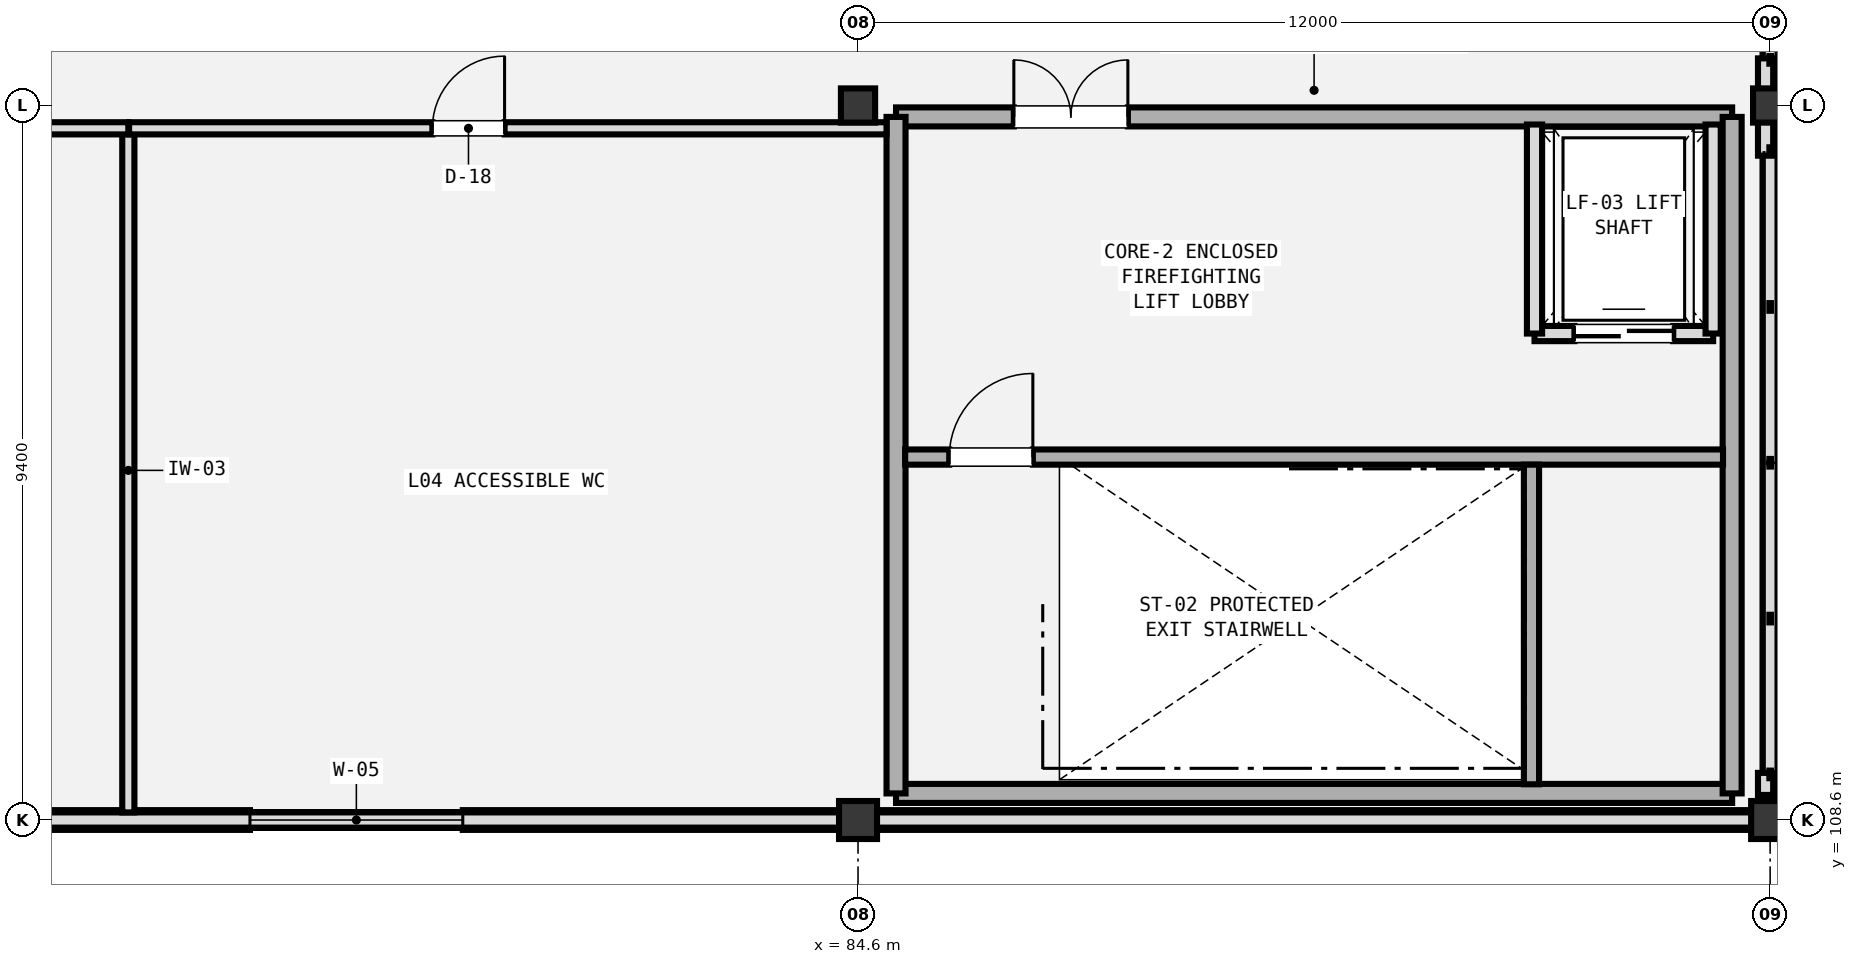
"""IFC4 building model, lengths in metres.
Left out: names, types, materials, properties, quantities, classifications, styles, units other than length and angle.
Written with IfcOpenShell. Run it as: python <this file> out.ifc"""

import sys

from ifc_helpers import new_model, si_unit, direction, frame, frame_2d, origin, origin_2d, place, context, subcontext, project, spatial, rectangle, extrude, element, fill, save


model = new_model("IFC4")
c1 = context("Model", 3, precision=1e-05, world=origin(), true_north=direction((0.0, 1.0)))
c2 = subcontext(c1, "Body", "Model", "MODEL_VIEW")
j1 = project(units=[si_unit("LENGTHUNIT", "METRE"), si_unit("PLANEANGLEUNIT", "RADIAN")], contexts=[c1])
p1 = place(None, origin())
s1 = spatial("IfcSite", under=j1, at=p1, CompositionType="ELEMENT")
p2 = place(p1, origin())
s2 = spatial("IfcBuilding", under=s1, at=p2, CompositionType="ELEMENT")
p3 = place(p2, frame((0.0, 0.0, 18.6)))
s3 = spatial("IfcBuildingStorey", under=s2, at=p3, CompositionType="ELEMENT", Elevation=18.6)
p4 = place(p3, frame((84.6, 108.6, 0.0), z_axis=(0.0, 0.0, 1.0), x_axis=(1.0, 0.0, 0.0)))
e1 = element("IfcColumn", 1, at=p4, inside=s3, PredefinedType="COLUMN", context=c2, shape_type="SweptSolid", body=[
    extrude(rectangle(XDim=0.5, YDim=0.5, at=origin_2d()), origin(), (0.0, 0.0, 1.0), 3.88),
])
p5 = place(p3, frame((84.6, 118.0, 0.0), z_axis=(0.0, 0.0, 1.0), x_axis=(1.0, 0.0, 0.0)))
e2 = element("IfcColumn", 2, at=p5, inside=s3, PredefinedType="COLUMN", context=c2, shape_type="SweptSolid", body=[
    extrude(rectangle(XDim=0.45, YDim=0.45, at=origin_2d()), origin(), (0.0, 0.0, 1.0), 3.88),
])
p6 = place(p3, frame((96.6, 108.6, 0.0), z_axis=(0.0, 0.0, 1.0), x_axis=(1.0, 0.0, 0.0)))
e3 = element("IfcColumn", 3, at=p6, inside=s3, PredefinedType="COLUMN", context=c2, shape_type="SweptSolid", body=[
    extrude(rectangle(XDim=0.5, YDim=0.5, at=origin_2d()), origin(), (0.0, 0.0, 1.0), 3.88),
])
p7 = place(p3, frame((96.6, 118.0, 0.0), z_axis=(0.0, 0.0, 1.0), x_axis=(1.0, 0.0, 0.0)))
e4 = element("IfcColumn", 4, at=p7, inside=s3, PredefinedType="COLUMN", context=c2, shape_type="SweptSolid", body=[
    extrude(rectangle(XDim=0.45, YDim=0.45, at=origin_2d()), origin(), (0.0, 0.0, 1.0), 3.88),
])
p8 = place(p3, frame((48.6, 108.6, 0.0), z_axis=(0.0, 0.0, 1.0), x_axis=(1.0, 0.0, 0.0)))
e5 = element("IfcWall", 5, at=p8, inside=s3, PredefinedType="SOLIDWALL", context=c2, shape_type="SweptSolid", body=[
    extrude(rectangle(XDim=48.0, YDim=0.26, at=frame_2d((24.0, 0.0))), origin(), (0.0, 0.0, 1.0), 3.43),
])
p9 = place(p8, frame((14.0, 0.0, 0.85)))
e6 = element("IfcOpeningElement", 6, at=p9, cuts=e5, PredefinedType="OPENING", context=c2, shape_type="SweptSolid", body=[
    extrude(rectangle(XDim=3.6, YDim=1.2, at=frame_2d((1.8, 0.6))), frame((0.0, 0.14, 0.0), z_axis=(0.0, -1.0, 0.0), x_axis=(1.0, 0.0, 0.0)), (0.0, 0.0, 1.0), 0.28),
])
p10 = place(p8, frame((28.0, 0.0, 0.85)))
e7 = element("IfcOpeningElement", 7, at=p10, cuts=e5, PredefinedType="OPENING", context=c2, shape_type="SweptSolid", body=[
    extrude(rectangle(XDim=2.8, YDim=1.2, at=frame_2d((1.4, 0.6))), frame((0.0, 0.14, 0.0), z_axis=(0.0, -1.0, 0.0), x_axis=(1.0, 0.0, 0.0)), (0.0, 0.0, 1.0), 0.28),
])
p11 = place(p3, frame((48.6, 108.6, 4.2), z_axis=(0.0, 0.0, 1.0), x_axis=(1.0, 0.0, 0.0)))
e8 = element("IfcWall", 8, at=p11, inside=s3, PredefinedType="PARAPET", context=c2, shape_type="SweptSolid", body=[
    extrude(rectangle(XDim=48.0, YDim=0.2, at=frame_2d((24.0, 0.0))), origin(), (0.0, 0.0, 1.0), 1.15),
])
p12 = place(p3, frame((96.6, 108.6, 4.2), z_axis=(0.0, 0.0, 1.0), x_axis=(0.0, 1.0, 0.0)))
e9 = element("IfcWall", 9, at=p12, inside=s3, PredefinedType="PARAPET", context=c2, shape_type="SweptSolid", body=[
    extrude(rectangle(XDim=27.4, YDim=0.2, at=frame_2d((13.7, 0.0))), origin(), (0.0, 0.0, 1.0), 1.15),
])
p13 = place(p3, frame((85.1, 108.95, 0.0), z_axis=(0.0, 0.0, 1.0), x_axis=(1.0, 0.0, 0.0)))
e10 = element("IfcWall", 10, at=p13, inside=s3, PredefinedType="SHEAR", context=c2, shape_type="SweptSolid", body=[
    extrude(rectangle(XDim=11.0, YDim=0.25, at=frame_2d((5.5, 0.0))), origin(), (0.0, 0.0, 1.0), 3.88),
])
p14 = place(p3, frame((85.1, 117.85, 0.0), z_axis=(0.0, 0.0, 1.0), x_axis=(1.0, 0.0, 0.0)))
e11 = element("IfcWall", 11, at=p14, inside=s3, PredefinedType="SHEAR", context=c2, shape_type="SweptSolid", body=[
    extrude(rectangle(XDim=11.0, YDim=0.25, at=frame_2d((5.5, 0.0))), origin(), (0.0, 0.0, 1.0), 3.88),
])
p15 = place(p14, frame((1.55, 0.0, 0.0)))
e12 = element("IfcOpeningElement", 12, at=p15, cuts=e11, PredefinedType="OPENING", context=c2, shape_type="SweptSolid", body=[
    extrude(rectangle(XDim=1.5, YDim=2.2, at=frame_2d((0.75, 1.1))), frame((0.0, 0.135, 0.0), z_axis=(0.0, -1.0, 0.0), x_axis=(1.0, 0.0, 0.0)), (0.0, 0.0, 1.0), 0.27),
])
for number, where, z_axis, x_axis in (
    (13, (85.1, 108.95, 0.0), (0.0, 0.0, 1.0), (0.0, 1.0, 0.0)),
    (14, (96.1, 108.95, 0.0), (0.0, 0.0, 1.0), (0.0, 1.0, 0.0)),
):
    element("IfcWall", number, at=place(p3, frame(where, z_axis=z_axis, x_axis=x_axis)), inside=s3, PredefinedType="SHEAR", context=c2, shape_type="SweptSolid", body=[
        extrude(rectangle(XDim=8.9, YDim=0.25, at=frame_2d((4.45, 0.0))), origin(), (0.0, 0.0, 1.0), 3.88),
    ])
p16 = place(p3, frame((85.22, 113.375, 0.0), z_axis=(0.0, 0.0, 1.0), x_axis=(1.0, 0.0, 0.0)))
e15 = element("IfcWall", 15, at=p16, inside=s3, PredefinedType="SHEAR", context=c2, shape_type="SweptSolid", body=[
    extrude(rectangle(XDim=10.76, YDim=0.2, at=frame_2d((5.38, 0.0))), origin(), (0.0, 0.0, 1.0), 3.88),
])
p17 = place(p16, frame((0.58, 0.0, 0.0)))
e16 = element("IfcOpeningElement", 16, at=p17, cuts=e15, PredefinedType="OPENING", context=c2, shape_type="SweptSolid", body=[
    extrude(rectangle(XDim=1.1, YDim=2.2, at=frame_2d((0.55, 1.1))), frame((0.0, 0.11, 0.0), z_axis=(0.0, -1.0, 0.0), x_axis=(1.0, 0.0, 0.0)), (0.0, 0.0, 1.0), 0.22),
])
p18 = place(p3, frame((93.46, 109.07, 0.0), z_axis=(0.0, 0.0, 1.0), x_axis=(0.0, 1.0, 0.0)))
e17 = element("IfcWall", 17, at=p18, inside=s3, PredefinedType="SHEAR", context=c2, shape_type="SweptSolid", body=[
    extrude(rectangle(XDim=4.205, YDim=0.2, at=frame_2d((2.103, 0.0))), origin(), (0.0, 0.0, 1.0), 3.88),
])
p19 = place(p3, frame((93.5, 115.0, 0.0), z_axis=(0.0, 0.0, 1.0), x_axis=(1.0, 0.0, 0.0)))
e18 = element("IfcWall", 18, at=p19, inside=s3, PredefinedType="SOLIDWALL", context=c2, shape_type="SweptSolid", body=[
    extrude(rectangle(XDim=2.35, YDim=0.2, at=frame_2d((1.175, 0.0))), origin(), (0.0, 0.0, 1.0), 3.28),
])
p20 = place(p19, frame((0.525, 0.0, 0.0)))
e19 = element("IfcOpeningElement", 19, at=p20, cuts=e18, PredefinedType="OPENING", context=c2, shape_type="SweptSolid", body=[
    extrude(rectangle(XDim=1.3, YDim=2.3, at=frame_2d((0.65, 1.15))), frame((0.0, 0.11, 0.0), z_axis=(0.0, -1.0, 0.0), x_axis=(1.0, 0.0, 0.0)), (0.0, 0.0, 1.0), 0.22),
])
for number, where, z_axis, x_axis in (
    (20, (93.5, 115.0, 0.0), (0.0, 0.0, 1.0), (0.0, 1.0, 0.0)),
    (21, (95.85, 115.0, 0.0), (0.0, 0.0, 1.0), (0.0, 1.0, 0.0)),
):
    element("IfcWall", number, at=place(p3, frame(where, z_axis=z_axis, x_axis=x_axis)), inside=s3, PredefinedType="SOLIDWALL", context=c2, shape_type="SweptSolid", body=[
        extrude(rectangle(XDim=2.75, YDim=0.2, at=frame_2d((1.375, 0.0))), origin(), (0.0, 0.0, 1.0), 3.88),
    ])
p21 = place(p3, frame((75.0, 108.7, 0.0), z_axis=(0.0, 0.0, 1.0), x_axis=(0.0, 1.0, 0.0)))
e22 = element("IfcWall", 22, at=p21, inside=s3, PredefinedType="PLUMBINGWALL", context=c2, shape_type="SweptSolid", body=[
    extrude(rectangle(XDim=9.0, YDim=0.16, at=frame_2d((4.5, 0.0))), origin(), (0.0, 0.0, 1.0), 3.25),
])
p22 = place(p3, frame((67.61, 117.7, 0.0), z_axis=(0.0, 0.0, 1.0), x_axis=(1.0, 0.0, 0.0)))
e23 = element("IfcWall", 23, at=p22, inside=s3, PredefinedType="PLUMBINGWALL", context=c2, shape_type="SweptSolid", body=[
    extrude(rectangle(XDim=7.39, YDim=0.16, at=frame_2d((3.695, 0.0))), origin(), (0.0, 0.0, 1.0), 3.25),
])
p23 = place(p22, frame((2.99, 0.0, 0.0)))
e24 = element("IfcOpeningElement", 24, at=p23, cuts=e23, PredefinedType="OPENING", context=c2, shape_type="SweptSolid", body=[
    extrude(rectangle(XDim=0.95, YDim=2.15, at=frame_2d((0.475, 1.075))), frame((0.0, 0.09, 0.0), z_axis=(0.0, -1.0, 0.0), x_axis=(1.0, 0.0, 0.0)), (0.0, 0.0, 1.0), 0.18),
])
p24 = place(p3, frame((75.01, 117.7, 0.0), z_axis=(0.0, 0.0, 1.0), x_axis=(1.0, 0.0, 0.0)))
e25 = element("IfcWall", 25, at=p24, inside=s3, PredefinedType="PLUMBINGWALL", context=c2, shape_type="SweptSolid", body=[
    extrude(rectangle(XDim=9.965, YDim=0.16, at=frame_2d((4.982, 0.0))), origin(), (0.0, 0.0, 1.0), 3.25),
])
p25 = place(p24, frame((3.99, 0.0, 0.0)))
e26 = element("IfcOpeningElement", 26, at=p25, cuts=e25, PredefinedType="OPENING", context=c2, shape_type="SweptSolid", body=[
    extrude(rectangle(XDim=0.95, YDim=2.15, at=frame_2d((0.475, 1.075))), frame((0.0, 0.09, 0.0), z_axis=(0.0, -1.0, 0.0), x_axis=(1.0, 0.0, 0.0)), (0.0, 0.0, 1.0), 0.18),
])
p26 = place(p3, frame((96.54, 118.62, 0.0), z_axis=(0.0, 0.0, 1.0), x_axis=(0.0, -1.0, 0.0)))
e27 = element("IfcWall", 27, at=p26, inside=s3, PredefinedType="SOLIDWALL", context=c2, shape_type="SweptSolid", body=[
    extrude(rectangle(XDim=1.28, YDim=0.2, at=frame_2d((0.64, 0.0))), origin(), (0.0, 0.0, 1.0), 3.2),
])
p27 = place(p3, frame((96.54, 109.22, 0.0), z_axis=(0.0, 0.0, 1.0), x_axis=(0.0, -1.0, 0.0)))
e28 = element("IfcWall", 28, at=p27, inside=s3, PredefinedType="SOLIDWALL", context=c2, shape_type="SweptSolid", body=[
    extrude(rectangle(XDim=0.29, YDim=0.2, at=frame_2d((0.145, 0.0))), origin(), (0.0, 0.0, 1.0), 3.2),
])
p28 = place(p10, frame((2.8, 0.0, 0.0), z_axis=(0.0, 0.0, 1.0), x_axis=(-1.0, 0.0, 0.0)))
e29 = element("IfcWindow", 29, at=p28, inside=s3, PartitioningType="DOUBLE_PANEL_HORIZONTAL", PredefinedType="WINDOW", context=c2, shape_type="SweptSolid", body=[
    extrude(rectangle(XDim=2.8, YDim=1.2, at=frame_2d((1.4, 0.6))), frame((0.0, 0.03, 0.0), z_axis=(0.0, -1.0, 0.0), x_axis=(1.0, 0.0, 0.0)), (0.0, 0.0, 1.0), 0.06),
])
fill(e7, e29)
p29 = place(p15, origin())
e30 = element("IfcDoor", 30, at=p29, inside=s3, OperationType="DOUBLE_DOOR_SINGLE_SWING", PredefinedType="DOOR", context=c2, shape_type="SweptSolid", body=[
    extrude(rectangle(XDim=1.5, YDim=2.2, at=frame_2d((0.75, 1.1))), frame((0.0, 0.025, 0.0), z_axis=(0.0, -1.0, 0.0), x_axis=(1.0, 0.0, 0.0)), (0.0, 0.0, 1.0), 0.05),
])
fill(e12, e30)
p30 = place(p17, origin())
e31 = element("IfcDoor", 31, at=p30, inside=s3, OperationType="SINGLE_SWING_RIGHT", PredefinedType="DOOR", context=c2, shape_type="SweptSolid", body=[
    extrude(rectangle(XDim=1.1, YDim=2.2, at=frame_2d((0.55, 1.1))), frame((0.0, 0.025, 0.0), z_axis=(0.0, -1.0, 0.0), x_axis=(1.0, 0.0, 0.0)), (0.0, 0.0, 1.0), 0.05),
])
fill(e16, e31)
p31 = place(p20, frame((1.3, 0.0, 0.0), z_axis=(0.0, 0.0, 1.0), x_axis=(-1.0, 0.0, 0.0)))
e32 = element("IfcDoor", 32, at=p31, inside=s3, OperationType="DOUBLE_DOOR_SLIDING", PredefinedType="DOOR", context=c2, shape_type="SweptSolid", body=[
    extrude(rectangle(XDim=1.3, YDim=2.3, at=frame_2d((0.65, 1.15))), frame((0.0, 0.025, 0.0), z_axis=(0.0, -1.0, 0.0), x_axis=(1.0, 0.0, 0.0)), (0.0, 0.0, 1.0), 0.05),
])
fill(e19, e32)
p32 = place(p25, origin())
e33 = element("IfcDoor", 33, at=p32, inside=s3, OperationType="SINGLE_SWING_RIGHT", PredefinedType="DOOR", context=c2, shape_type="SweptSolid", body=[
    extrude(rectangle(XDim=0.95, YDim=2.15, at=frame_2d((0.475, 1.075))), frame((0.0, 0.025, 0.0), z_axis=(0.0, -1.0, 0.0), x_axis=(1.0, 0.0, 0.0)), (0.0, 0.0, 1.0), 0.05),
])
fill(e26, e33)
save(model, sys.argv[1])
